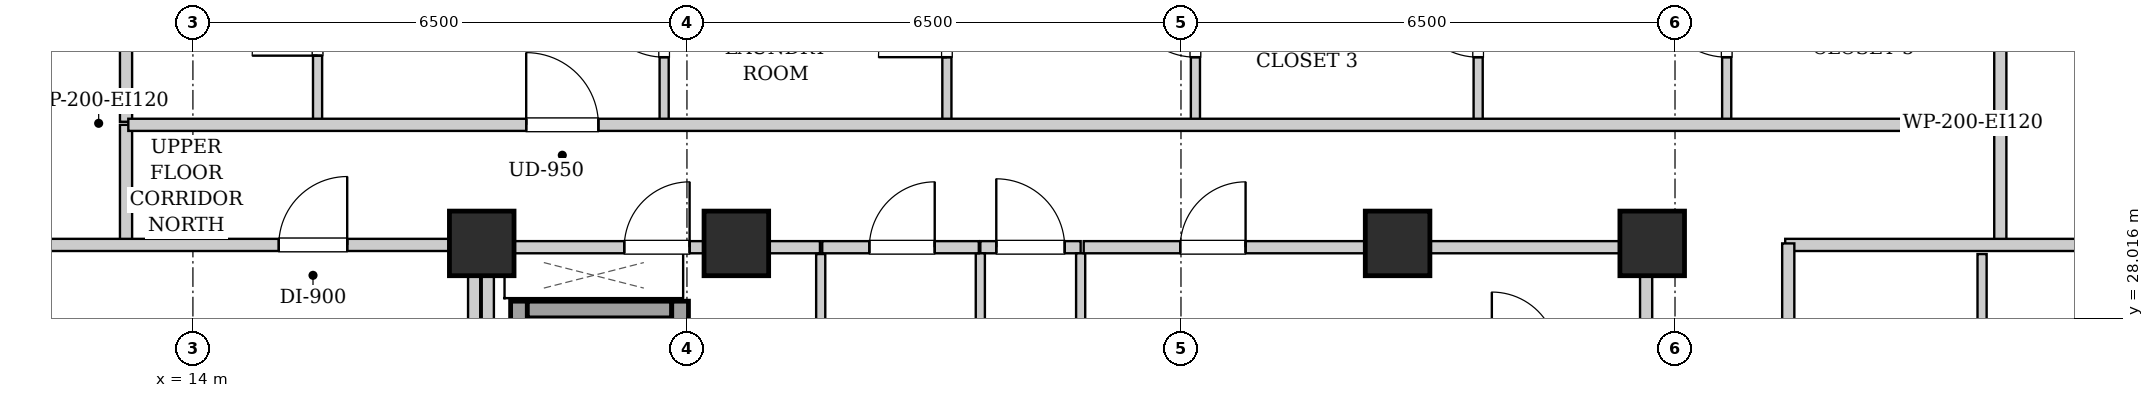
"""IFC4 building model, lengths in metres.
Left out: names, types, materials, properties, quantities, classifications, styles, units other than length and angle.
Written with IfcOpenShell. Run it as: python <this file> out.ifc"""

import sys

from ifc_helpers import new_model, si_unit, direction, frame, frame_2d, origin, origin_2d, place, context, subcontext, project, spatial, rectangle, extrude, element, fill, save


model = new_model("IFC4")
c1 = context("Model", 3, precision=1e-05, world=origin(), true_north=direction((0.0, 1.0)))
c2 = subcontext(c1, "Body", "Model", "MODEL_VIEW")
j1 = project(units=[si_unit("LENGTHUNIT", "METRE"), si_unit("PLANEANGLEUNIT", "RADIAN")], contexts=[c1])
p1 = place(None, origin())
s1 = spatial("IfcSite", under=j1, at=p1, CompositionType="ELEMENT")
p2 = place(p1, origin())
s2 = spatial("IfcBuilding", under=s1, at=p2, CompositionType="ELEMENT")
p3 = place(p2, frame((0.0, 0.0, 177.7)))
s3 = spatial("IfcBuildingStorey", under=s2, at=p3, CompositionType="ELEMENT", Elevation=177.7)
for number, where, z_axis, x_axis in (
    (1, (17.8, 29.0, 0.0), (0.0, 0.0, 1.0), (1.0, 0.0, 0.0)),
    (2, (21.15, 29.0, 0.0), (0.0, 0.0, 1.0), (1.0, 0.0, 0.0)),
    (3, (29.85, 29.0, 0.0), (0.0, 0.0, 1.0), (1.0, 0.0, 0.0)),
    (4, (33.2, 29.0, 0.0), (0.0, 0.0, 1.0), (1.0, 0.0, 0.0)),
):
    element("IfcColumn", number, at=place(p3, frame(where, z_axis=z_axis, x_axis=x_axis)), inside=s3, PredefinedType="COLUMN", context=c2, shape_type="SweptSolid", body=[
        extrude(rectangle(XDim=0.85, YDim=0.85, at=origin_2d()), origin(), (0.0, 0.0, 1.0), 3.3),
    ])
p4 = place(p3, frame((18.29, 24.1, 0.0), z_axis=(0.0, 0.0, 1.0), x_axis=(0.0, 1.0, 0.0)))
e5 = element("IfcWall", 5, at=p4, inside=s3, PredefinedType="SHEAR", context=c2, shape_type="SweptSolid", body=[
    extrude(rectangle(XDim=4.14, YDim=0.22, at=frame_2d((2.07, 0.0))), origin(), (0.0, 0.0, 1.0), 3.04),
])
p5 = place(p3, frame((18.4, 28.13, 0.0), z_axis=(0.0, 0.0, 1.0), x_axis=(1.0, 0.0, 0.0)))
e6 = element("IfcWall", 6, at=p5, inside=s3, PredefinedType="SHEAR", context=c2, shape_type="SweptSolid", body=[
    extrude(rectangle(XDim=1.9, YDim=0.22, at=frame_2d((0.95, 0.0))), origin(), (0.0, 0.0, 1.0), 3.04),
])
p6 = place(p3, frame((20.41, 26.06, 0.0), z_axis=(0.0, 0.0, 1.0), x_axis=(0.0, 1.0, 0.0)))
e7 = element("IfcWall", 7, at=p6, inside=s3, PredefinedType="SHEAR", context=c2, shape_type="SweptSolid", body=[
    extrude(rectangle(XDim=2.18, YDim=0.22, at=frame_2d((1.09, 0.0))), origin(), (0.0, 0.0, 1.0), 3.04),
])
p7 = place(p6, frame((0.54, 0.0, 0.0)))
e8 = element("IfcOpeningElement", 8, at=p7, cuts=e7, PredefinedType="OPENING", context=c2, shape_type="SweptSolid", body=[
    extrude(rectangle(XDim=1.1, YDim=2.15, at=frame_2d((0.55, 1.075))), frame((0.0, 0.12, 0.0), z_axis=(0.0, -1.0, 0.0), x_axis=(1.0, 0.0, 0.0)), (0.0, 0.0, 1.0), 0.24),
])
for number, where, z_axis, x_axis in (
    (9, (17.88, 24.12, 0.0), (0.0, 0.0, 1.0), (0.0, 1.0, 0.0)),
    (10, (33.12, 24.12, 0.0), (0.0, 0.0, 1.0), (0.0, 1.0, 0.0)),
):
    element("IfcWall", number, at=place(p3, frame(where, z_axis=z_axis, x_axis=x_axis)), inside=s3, PredefinedType="PARTITIONING", context=c2, shape_type="SweptSolid", body=[
        extrude(rectangle(XDim=4.76, YDim=0.16, at=frame_2d((2.38, 0.0))), origin(), (0.0, 0.0, 1.0), 2.375),
    ])
p8 = place(p3, frame((24.36, 28.95, 0.0), z_axis=(0.0, 0.0, 1.0), x_axis=(1.0, 0.0, 0.0)))
e11 = element("IfcWall", 11, at=p8, inside=s3, PredefinedType="PARTITIONING", context=c2, shape_type="SweptSolid", body=[
    extrude(rectangle(XDim=1.32, YDim=0.16, at=frame_2d((0.66, 0.0))), origin(), (0.0, 0.0, 1.0), 2.556),
])
p9 = place(p8, frame((0.21, 0.0, 0.0)))
e12 = element("IfcOpeningElement", 12, at=p9, cuts=e11, PredefinedType="OPENING", context=c2, shape_type="SweptSolid", body=[
    extrude(rectangle(XDim=0.9, YDim=2.05, at=frame_2d((0.45, 1.025))), frame((0.0, 0.09, 0.0), z_axis=(0.0, -1.0, 0.0), x_axis=(1.0, 0.0, 0.0)), (0.0, 0.0, 1.0), 0.18),
])
p10 = place(p3, frame((17.96, 28.95, 0.0), z_axis=(0.0, 0.0, 1.0), x_axis=(1.0, 0.0, 0.0)))
e13 = element("IfcWall", 13, at=p10, inside=s3, PredefinedType="PARTITIONING", context=c2, shape_type="SweptSolid", body=[
    extrude(rectangle(XDim=4.29, YDim=0.16, at=frame_2d((2.145, 0.0))), origin(), (0.0, 0.0, 1.0), 2.556),
])
p11 = place(p10, frame((1.715, 0.0, 0.0)))
e14 = element("IfcOpeningElement", 14, at=p11, cuts=e13, PredefinedType="OPENING", context=c2, shape_type="SweptSolid", body=[
    extrude(rectangle(XDim=0.86, YDim=2.05, at=frame_2d((0.43, 1.025))), frame((0.0, 0.09, 0.0), z_axis=(0.0, -1.0, 0.0), x_axis=(1.0, 0.0, 0.0)), (0.0, 0.0, 1.0), 0.18),
])
for number, where, z_axis, x_axis in (
    (15, (24.36, 25.0, 0.0), (0.0, 0.0, 1.0), (0.0, 1.0, 0.0)),
    (16, (25.68, 25.0, 0.0), (0.0, 0.0, 1.0), (0.0, 1.0, 0.0)),
):
    element("IfcWall", number, at=place(p3, frame(where, z_axis=z_axis, x_axis=x_axis)), inside=s3, PredefinedType="PARTITIONING", context=c2, shape_type="SweptSolid", body=[
        extrude(rectangle(XDim=3.87, YDim=0.12, at=frame_2d((1.935, 0.0))), origin(), (0.0, 0.0, 1.0), 3.04),
    ])
p12 = place(p3, frame((22.26, 25.0, 0.0), z_axis=(0.0, 0.0, 1.0), x_axis=(0.0, 1.0, 0.0)))
e17 = element("IfcWall", 17, at=p12, inside=s3, PredefinedType="PARTITIONING", context=c2, shape_type="SweptSolid", body=[
    extrude(rectangle(XDim=3.86, YDim=0.12, at=frame_2d((1.93, 0.0))), origin(), (0.0, 0.0, 1.0), 3.04),
])
p13 = place(p3, frame((22.28, 28.95, 0.0), z_axis=(0.0, 0.0, 1.0), x_axis=(1.0, 0.0, 0.0)))
e18 = element("IfcWall", 18, at=p13, inside=s3, PredefinedType="PARTITIONING", context=c2, shape_type="SweptSolid", body=[
    extrude(rectangle(XDim=2.06, YDim=0.16, at=frame_2d((1.03, 0.0))), origin(), (0.0, 0.0, 1.0), 2.556),
])
p14 = place(p13, frame((0.62, 0.0, 0.0)))
e19 = element("IfcOpeningElement", 19, at=p14, cuts=e18, PredefinedType="OPENING", context=c2, shape_type="SweptSolid", body=[
    extrude(rectangle(XDim=0.86, YDim=2.05, at=frame_2d((0.43, 1.025))), frame((0.0, 0.09, 0.0), z_axis=(0.0, -1.0, 0.0), x_axis=(1.0, 0.0, 0.0)), (0.0, 0.0, 1.0), 0.18),
])
p15 = place(p3, frame((25.72, 28.95, 0.0), z_axis=(0.0, 0.0, 1.0), x_axis=(1.0, 0.0, 0.0)))
e20 = element("IfcWall", 20, at=p15, inside=s3, PredefinedType="PARTITIONING", context=c2, shape_type="SweptSolid", body=[
    extrude(rectangle(XDim=7.32, YDim=0.16, at=frame_2d((3.66, 0.0))), origin(), (0.0, 0.0, 1.0), 2.556),
])
p16 = place(p15, frame((1.27, 0.0, 0.0)))
e21 = element("IfcOpeningElement", 21, at=p16, cuts=e20, PredefinedType="OPENING", context=c2, shape_type="SweptSolid", body=[
    extrude(rectangle(XDim=0.86, YDim=2.05, at=frame_2d((0.43, 1.025))), frame((0.0, 0.09, 0.0), z_axis=(0.0, -1.0, 0.0), x_axis=(1.0, 0.0, 0.0)), (0.0, 0.0, 1.0), 0.18),
])
for number, where, z_axis, x_axis in (
    (22, (13.12, 28.98, 0.0), (0.0, 0.0, 1.0), (0.0, 1.0, 0.0)),
    (23, (37.78, 28.98, 0.0), (0.0, 0.0, 1.0), (0.0, 1.0, 0.0)),
):
    element("IfcWall", number, at=place(p3, frame(where, z_axis=z_axis, x_axis=x_axis)), inside=s3, PredefinedType="PARTITIONING", context=c2, shape_type="SweptSolid", body=[
        extrude(rectangle(XDim=1.58, YDim=0.16, at=frame_2d((0.79, 0.0))), origin(), (0.0, 0.0, 1.0), 3.04),
    ])
p17 = place(p3, frame((10.88, 28.98, 0.0), z_axis=(0.0, 0.0, 1.0), x_axis=(1.0, 0.0, 0.0)))
e24 = element("IfcWall", 24, at=p17, inside=s3, PredefinedType="PARTITIONING", context=c2, shape_type="SweptSolid", body=[
    extrude(rectangle(XDim=6.88, YDim=0.16, at=frame_2d((3.44, 0.0))), origin(), (0.0, 0.0, 1.0), 2.556),
])
p18 = place(p17, frame((4.25, 0.0, 0.0)))
e25 = element("IfcOpeningElement", 25, at=p18, cuts=e24, PredefinedType="OPENING", context=c2, shape_type="SweptSolid", body=[
    extrude(rectangle(XDim=0.9, YDim=2.05, at=frame_2d((0.45, 1.025))), frame((0.0, 0.09, 0.0), z_axis=(0.0, -1.0, 0.0), x_axis=(1.0, 0.0, 0.0)), (0.0, 0.0, 1.0), 0.18),
])
p19 = place(p3, frame((34.95, 28.98, 0.0), z_axis=(0.0, 0.0, 1.0), x_axis=(1.0, 0.0, 0.0)))
e26 = element("IfcWall", 26, at=p19, inside=s3, PredefinedType="PARTITIONING", context=c2, shape_type="SweptSolid", body=[
    extrude(rectangle(XDim=5.07, YDim=0.16, at=frame_2d((2.535, 0.0))), origin(), (0.0, 0.0, 1.0), 2.556),
])
for number, where, z_axis, x_axis in (
    (27, (13.12, 30.6, 0.0), (0.0, 0.0, 1.0), (0.0, 1.0, 0.0)),
    (28, (37.78, 30.6, 0.0), (0.0, 0.0, 1.0), (0.0, 1.0, 0.0)),
):
    element("IfcWall", number, at=place(p3, frame(where, z_axis=z_axis, x_axis=x_axis)), inside=s3, PredefinedType="PARTITIONING", context=c2, shape_type="SweptSolid", body=[
        extrude(rectangle(XDim=2.66, YDim=0.16, at=frame_2d((1.33, 0.0))), origin(), (0.0, 0.0, 1.0), 3.04),
    ])
p20 = place(p3, frame((15.64, 30.6, 0.0), z_axis=(0.0, 0.0, 1.0), x_axis=(0.0, 1.0, 0.0)))
e29 = element("IfcWall", 29, at=p20, inside=s3, PredefinedType="PARTITIONING", context=c2, shape_type="SweptSolid", body=[
    extrude(rectangle(XDim=2.6, YDim=0.12, at=frame_2d((1.3, 0.0))), origin(), (0.0, 0.0, 1.0), 3.04),
])
p21 = place(p20, frame((0.87, 0.0, 0.0)))
e30 = element("IfcOpeningElement", 30, at=p21, cuts=e29, PredefinedType="OPENING", context=c2, shape_type="SweptSolid", body=[
    extrude(rectangle(XDim=0.86, YDim=2.05, at=frame_2d((0.43, 1.025))), frame((0.0, 0.07, 0.0), z_axis=(0.0, -1.0, 0.0), x_axis=(1.0, 0.0, 0.0)), (0.0, 0.0, 1.0), 0.14),
])
p22 = place(p3, frame((20.2, 30.6, 0.0), z_axis=(0.0, 0.0, 1.0), x_axis=(0.0, 1.0, 0.0)))
e31 = element("IfcWall", 31, at=p22, inside=s3, PredefinedType="PARTITIONING", context=c2, shape_type="SweptSolid", body=[
    extrude(rectangle(XDim=2.6, YDim=0.12, at=frame_2d((1.3, 0.0))), origin(), (0.0, 0.0, 1.0), 3.04),
])
p23 = place(p22, frame((0.85, 0.0, 0.0)))
e32 = element("IfcOpeningElement", 32, at=p23, cuts=e31, PredefinedType="OPENING", context=c2, shape_type="SweptSolid", body=[
    extrude(rectangle(XDim=0.9, YDim=2.05, at=frame_2d((0.45, 1.025))), frame((0.0, 0.07, 0.0), z_axis=(0.0, -1.0, 0.0), x_axis=(1.0, 0.0, 0.0)), (0.0, 0.0, 1.0), 0.14),
])
p24 = place(p3, frame((23.92, 30.6, 0.0), z_axis=(0.0, 0.0, 1.0), x_axis=(0.0, 1.0, 0.0)))
e33 = element("IfcWall", 33, at=p24, inside=s3, PredefinedType="PARTITIONING", context=c2, shape_type="SweptSolid", body=[
    extrude(rectangle(XDim=2.6, YDim=0.12, at=frame_2d((1.3, 0.0))), origin(), (0.0, 0.0, 1.0), 3.04),
])
p25 = place(p24, frame((0.85, 0.0, 0.0)))
e34 = element("IfcOpeningElement", 34, at=p25, cuts=e33, PredefinedType="OPENING", context=c2, shape_type="SweptSolid", body=[
    extrude(rectangle(XDim=0.9, YDim=2.05, at=frame_2d((0.45, 1.025))), frame((0.0, 0.07, 0.0), z_axis=(0.0, -1.0, 0.0), x_axis=(1.0, 0.0, 0.0)), (0.0, 0.0, 1.0), 0.14),
])
p26 = place(p3, frame((27.19, 30.6, 0.0), z_axis=(0.0, 0.0, 1.0), x_axis=(0.0, 1.0, 0.0)))
e35 = element("IfcWall", 35, at=p26, inside=s3, PredefinedType="PARTITIONING", context=c2, shape_type="SweptSolid", body=[
    extrude(rectangle(XDim=2.6, YDim=0.12, at=frame_2d((1.3, 0.0))), origin(), (0.0, 0.0, 1.0), 3.04),
])
p27 = place(p26, frame((0.85, 0.0, 0.0)))
e36 = element("IfcOpeningElement", 36, at=p27, cuts=e35, PredefinedType="OPENING", context=c2, shape_type="SweptSolid", body=[
    extrude(rectangle(XDim=0.9, YDim=2.05, at=frame_2d((0.45, 1.025))), frame((0.0, 0.07, 0.0), z_axis=(0.0, -1.0, 0.0), x_axis=(1.0, 0.0, 0.0)), (0.0, 0.0, 1.0), 0.14),
])
p28 = place(p3, frame((30.91, 30.6, 0.0), z_axis=(0.0, 0.0, 1.0), x_axis=(0.0, 1.0, 0.0)))
e37 = element("IfcWall", 37, at=p28, inside=s3, PredefinedType="PARTITIONING", context=c2, shape_type="SweptSolid", body=[
    extrude(rectangle(XDim=2.6, YDim=0.12, at=frame_2d((1.3, 0.0))), origin(), (0.0, 0.0, 1.0), 3.04),
])
p29 = place(p28, frame((0.85, 0.0, 0.0)))
e38 = element("IfcOpeningElement", 38, at=p29, cuts=e37, PredefinedType="OPENING", context=c2, shape_type="SweptSolid", body=[
    extrude(rectangle(XDim=0.9, YDim=2.05, at=frame_2d((0.45, 1.025))), frame((0.0, 0.07, 0.0), z_axis=(0.0, -1.0, 0.0), x_axis=(1.0, 0.0, 0.0)), (0.0, 0.0, 1.0), 0.14),
])
p30 = place(p3, frame((34.18, 30.6, 0.0), z_axis=(0.0, 0.0, 1.0), x_axis=(0.0, 1.0, 0.0)))
e39 = element("IfcWall", 39, at=p30, inside=s3, PredefinedType="PARTITIONING", context=c2, shape_type="SweptSolid", body=[
    extrude(rectangle(XDim=2.6, YDim=0.12, at=frame_2d((1.3, 0.0))), origin(), (0.0, 0.0, 1.0), 3.04),
])
p31 = place(p30, frame((0.85, 0.0, 0.0)))
e40 = element("IfcOpeningElement", 40, at=p31, cuts=e39, PredefinedType="OPENING", context=c2, shape_type="SweptSolid", body=[
    extrude(rectangle(XDim=0.9, YDim=2.05, at=frame_2d((0.45, 1.025))), frame((0.0, 0.07, 0.0), z_axis=(0.0, -1.0, 0.0), x_axis=(1.0, 0.0, 0.0)), (0.0, 0.0, 1.0), 0.14),
])
p32 = place(p3, frame((37.54, 24.552, 0.0), z_axis=(0.0, 0.0, 1.0), x_axis=(0.0, 1.0, 0.0)))
e41 = element("IfcWall", 41, at=p32, inside=s3, PredefinedType="PARTITIONING", context=c2, shape_type="SweptSolid", body=[
    extrude(rectangle(XDim=4.308, YDim=0.12, at=frame_2d((2.154, 0.0))), origin(), (0.0, 0.0, 1.0), 3.04),
])
p33 = place(p32, frame((1.704, 0.0, 0.0)))
e42 = element("IfcOpeningElement", 42, at=p33, cuts=e41, PredefinedType="OPENING", context=c2, shape_type="SweptSolid", body=[
    extrude(rectangle(XDim=0.9, YDim=2.05, at=frame_2d((0.45, 1.025))), frame((0.0, 0.07, 0.0), z_axis=(0.0, -1.0, 0.0), x_axis=(1.0, 0.0, 0.0)), (0.0, 0.0, 1.0), 0.14),
])
p34 = place(p3, frame((13.15, 30.56, 0.0), z_axis=(0.0, 0.0, 1.0), x_axis=(1.0, 0.0, 0.0)))
e43 = element("IfcWall", 43, at=p34, inside=s3, PredefinedType="PARTITIONING", context=c2, shape_type="SweptSolid", body=[
    extrude(rectangle(XDim=24.6, YDim=0.16, at=frame_2d((12.3, 0.0))), origin(), (0.0, 0.0, 1.0), 3.04),
])
p35 = place(p34, frame((5.235, 0.0, 0.0)))
e44 = element("IfcOpeningElement", 44, at=p35, cuts=e43, PredefinedType="OPENING", context=c2, shape_type="SweptSolid", body=[
    extrude(rectangle(XDim=0.95, YDim=2.1, at=frame_2d((0.475, 1.05))), frame((0.0, 0.09, 0.0), z_axis=(0.0, -1.0, 0.0), x_axis=(1.0, 0.0, 0.0)), (0.0, 0.0, 1.0), 0.18),
])
p36 = place(p3, frame((17.7, 15.02, 0.0), z_axis=(0.0, 0.0, 1.0), x_axis=(0.0, 1.0, 0.0)))
e45 = element("IfcWall", 45, at=p36, inside=s3, PredefinedType="PARTITIONING", context=c2, shape_type="SweptSolid", body=[
    extrude(rectangle(XDim=13.98, YDim=0.16, at=frame_2d((6.99, 0.0))), origin(), (0.0, 0.0, 1.0), 2.375),
])
p37 = place(p3, frame((34.99, 15.07, 0.0), z_axis=(0.0, 0.0, 1.0), x_axis=(0.0, 1.0, 0.0)))
e46 = element("IfcWall", 46, at=p37, inside=s3, PredefinedType="PARTITIONING", context=c2, shape_type="SweptSolid", body=[
    extrude(rectangle(XDim=13.93, YDim=0.16, at=frame_2d((6.965, 0.0))), origin(), (0.0, 0.0, 1.0), 3.04),
])
p38 = place(p37, frame((4.385, 0.0, 0.0)))
e47 = element("IfcOpeningElement", 47, at=p38, cuts=e46, PredefinedType="OPENING", context=c2, shape_type="SweptSolid", body=[
    extrude(rectangle(XDim=0.95, YDim=2.1, at=frame_2d((0.475, 1.05))), frame((0.0, 0.09, 0.0), z_axis=(0.0, -1.0, 0.0), x_axis=(1.0, 0.0, 0.0)), (0.0, 0.0, 1.0), 0.18),
])
p39 = place(p9, origin())
e48 = element("IfcDoor", 48, at=p39, inside=s3, OperationType="SINGLE_SWING_LEFT", PredefinedType="DOOR", context=c2, shape_type="SweptSolid", body=[
    extrude(rectangle(XDim=0.9, YDim=2.05, at=frame_2d((0.45, 1.025))), frame((0.0, 0.025, 0.0), z_axis=(0.0, -1.0, 0.0), x_axis=(1.0, 0.0, 0.0)), (0.0, 0.0, 1.0), 0.05),
])
fill(e12, e48)
p40 = place(p11, origin())
e49 = element("IfcDoor", 49, at=p40, inside=s3, OperationType="SINGLE_SWING_RIGHT", PredefinedType="DOOR", context=c2, shape_type="SweptSolid", body=[
    extrude(rectangle(XDim=0.86, YDim=2.05, at=frame_2d((0.43, 1.025))), frame((0.0, 0.025, 0.0), z_axis=(0.0, -1.0, 0.0), x_axis=(1.0, 0.0, 0.0)), (0.0, 0.0, 1.0), 0.05),
])
fill(e14, e49)
p41 = place(p14, origin())
e50 = element("IfcDoor", 50, at=p41, inside=s3, OperationType="SINGLE_SWING_RIGHT", PredefinedType="DOOR", context=c2, shape_type="SweptSolid", body=[
    extrude(rectangle(XDim=0.86, YDim=2.05, at=frame_2d((0.43, 1.025))), frame((0.0, 0.025, 0.0), z_axis=(0.0, -1.0, 0.0), x_axis=(1.0, 0.0, 0.0)), (0.0, 0.0, 1.0), 0.05),
])
fill(e19, e50)
p42 = place(p16, origin())
e51 = element("IfcDoor", 51, at=p42, inside=s3, OperationType="SINGLE_SWING_RIGHT", PredefinedType="DOOR", context=c2, shape_type="SweptSolid", body=[
    extrude(rectangle(XDim=0.86, YDim=2.05, at=frame_2d((0.43, 1.025))), frame((0.0, 0.025, 0.0), z_axis=(0.0, -1.0, 0.0), x_axis=(1.0, 0.0, 0.0)), (0.0, 0.0, 1.0), 0.05),
])
fill(e21, e51)
p43 = place(p18, origin())
e52 = element("IfcDoor", 52, at=p43, inside=s3, OperationType="SINGLE_SWING_RIGHT", PredefinedType="DOOR", context=c2, shape_type="SweptSolid", body=[
    extrude(rectangle(XDim=0.9, YDim=2.05, at=frame_2d((0.45, 1.025))), frame((0.0, 0.025, 0.0), z_axis=(0.0, -1.0, 0.0), x_axis=(1.0, 0.0, 0.0)), (0.0, 0.0, 1.0), 0.05),
])
fill(e25, e52)
p44 = place(p21, origin())
e53 = element("IfcDoor", 53, at=p44, inside=s3, OperationType="SINGLE_SWING_LEFT", PredefinedType="DOOR", context=c2, shape_type="SweptSolid", body=[
    extrude(rectangle(XDim=0.86, YDim=2.05, at=frame_2d((0.43, 1.025))), frame((0.0, 0.025, 0.0), z_axis=(0.0, -1.0, 0.0), x_axis=(1.0, 0.0, 0.0)), (0.0, 0.0, 1.0), 0.05),
])
fill(e30, e53)
p45 = place(p23, origin())
e54 = element("IfcDoor", 54, at=p45, inside=s3, OperationType="SINGLE_SWING_RIGHT", PredefinedType="DOOR", context=c2, shape_type="SweptSolid", body=[
    extrude(rectangle(XDim=0.9, YDim=2.05, at=frame_2d((0.45, 1.025))), frame((0.0, 0.025, 0.0), z_axis=(0.0, -1.0, 0.0), x_axis=(1.0, 0.0, 0.0)), (0.0, 0.0, 1.0), 0.05),
])
fill(e32, e54)
p46 = place(p25, origin())
e55 = element("IfcDoor", 55, at=p46, inside=s3, OperationType="SINGLE_SWING_LEFT", PredefinedType="DOOR", context=c2, shape_type="SweptSolid", body=[
    extrude(rectangle(XDim=0.9, YDim=2.05, at=frame_2d((0.45, 1.025))), frame((0.0, 0.025, 0.0), z_axis=(0.0, -1.0, 0.0), x_axis=(1.0, 0.0, 0.0)), (0.0, 0.0, 1.0), 0.05),
])
fill(e34, e55)
p47 = place(p27, origin())
e56 = element("IfcDoor", 56, at=p47, inside=s3, OperationType="SINGLE_SWING_RIGHT", PredefinedType="DOOR", context=c2, shape_type="SweptSolid", body=[
    extrude(rectangle(XDim=0.9, YDim=2.05, at=frame_2d((0.45, 1.025))), frame((0.0, 0.025, 0.0), z_axis=(0.0, -1.0, 0.0), x_axis=(1.0, 0.0, 0.0)), (0.0, 0.0, 1.0), 0.05),
])
fill(e36, e56)
p48 = place(p29, origin())
e57 = element("IfcDoor", 57, at=p48, inside=s3, OperationType="SINGLE_SWING_RIGHT", PredefinedType="DOOR", context=c2, shape_type="SweptSolid", body=[
    extrude(rectangle(XDim=0.9, YDim=2.05, at=frame_2d((0.45, 1.025))), frame((0.0, 0.025, 0.0), z_axis=(0.0, -1.0, 0.0), x_axis=(1.0, 0.0, 0.0)), (0.0, 0.0, 1.0), 0.05),
])
fill(e38, e57)
p49 = place(p31, origin())
e58 = element("IfcDoor", 58, at=p49, inside=s3, OperationType="SINGLE_SWING_RIGHT", PredefinedType="DOOR", context=c2, shape_type="SweptSolid", body=[
    extrude(rectangle(XDim=0.9, YDim=2.05, at=frame_2d((0.45, 1.025))), frame((0.0, 0.025, 0.0), z_axis=(0.0, -1.0, 0.0), x_axis=(1.0, 0.0, 0.0)), (0.0, 0.0, 1.0), 0.05),
])
fill(e40, e58)
p50 = place(p35, origin())
e59 = element("IfcDoor", 59, at=p50, inside=s3, OperationType="SINGLE_SWING_LEFT", PredefinedType="DOOR", context=c2, shape_type="SweptSolid", body=[
    extrude(rectangle(XDim=0.95, YDim=2.1, at=frame_2d((0.475, 1.05))), frame((0.0, 0.025, 0.0), z_axis=(0.0, -1.0, 0.0), x_axis=(1.0, 0.0, 0.0)), (0.0, 0.0, 1.0), 0.05),
])
fill(e44, e59)
save(model, sys.argv[1])
